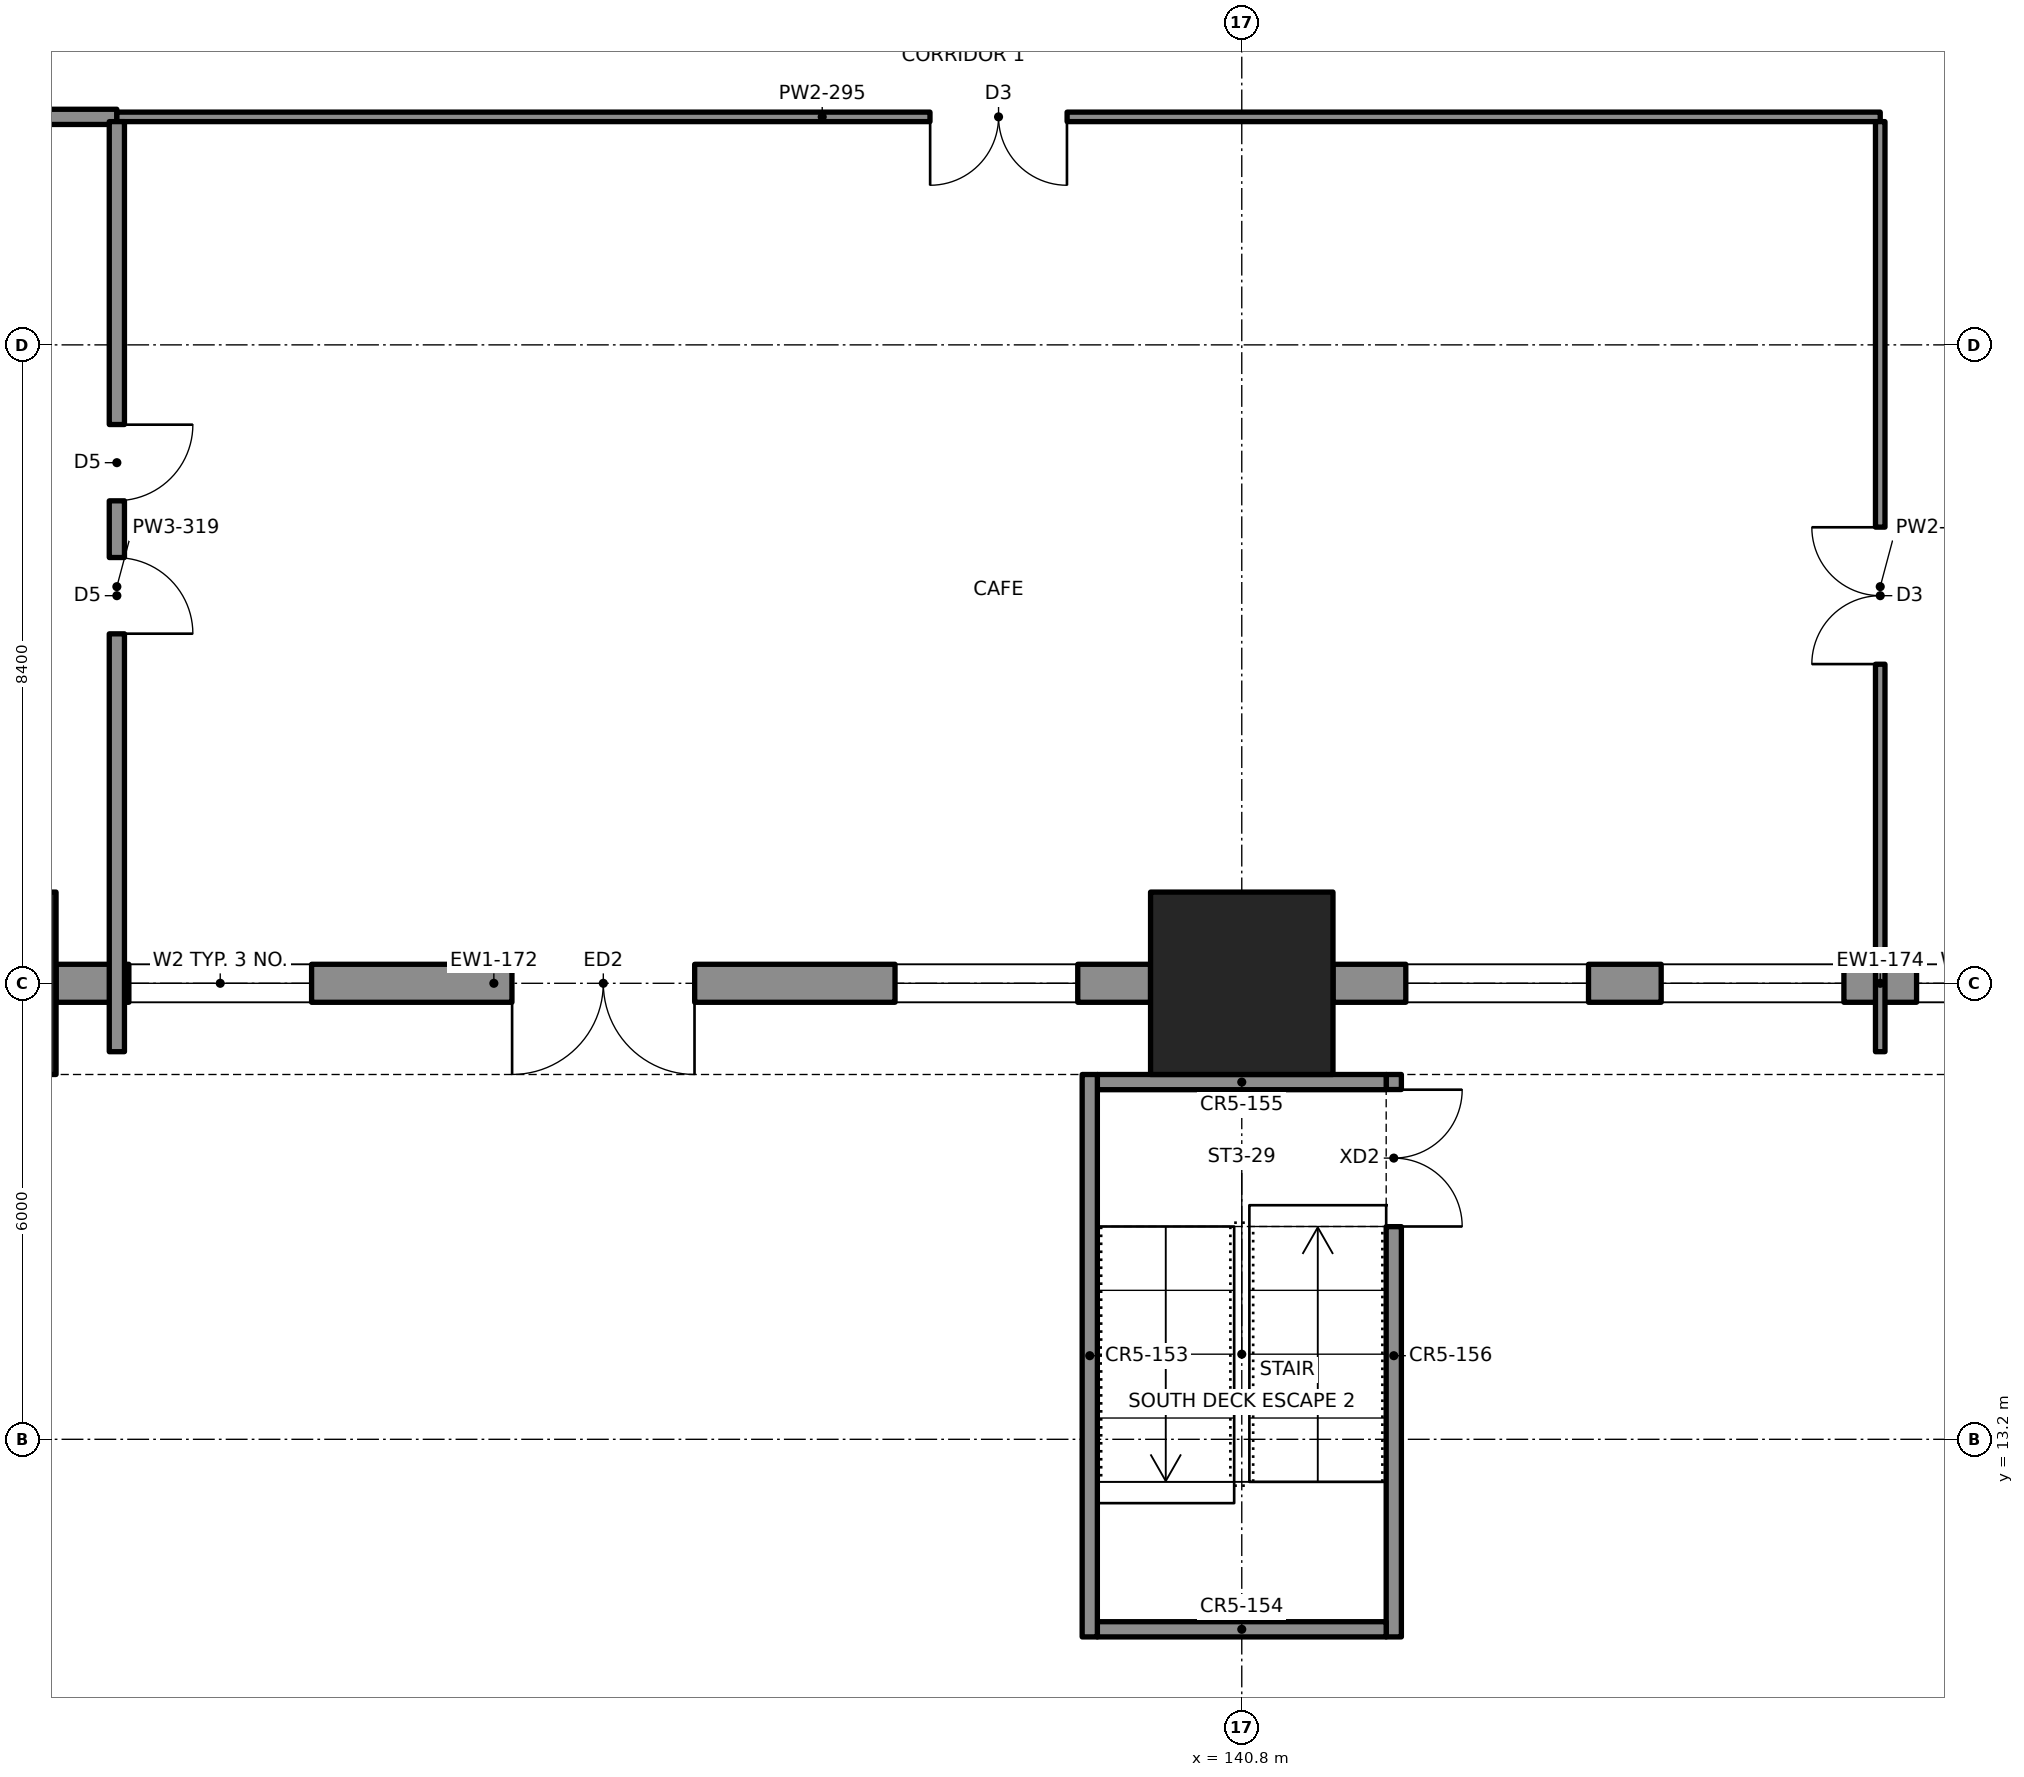
"""IFC4 building model, lengths in metres.
Left out: names, types, materials, properties, quantities, classifications, styles, units other than length and angle.
Written with IfcOpenShell. Run it as: python <this file> out.ifc"""

import sys

from ifc_helpers import new_model, si_unit, direction, frame, frame_2d, origin, origin_2d, place, context, subcontext, project, spatial, rectangle, extrude, element, fill, save


model = new_model("IFC4")
c1 = context("Model", 3, precision=1e-05, world=origin(), true_north=direction((0.0, 1.0)))
c2 = subcontext(c1, "Body", "Model", "MODEL_VIEW")
j1 = project(units=[si_unit("LENGTHUNIT", "METRE"), si_unit("PLANEANGLEUNIT", "RADIAN")], contexts=[c1])
p1 = place(None, origin())
s1 = spatial("IfcSite", under=j1, at=p1, CompositionType="ELEMENT")
p2 = place(p1, origin())
s2 = spatial("IfcBuilding", under=s1, at=p2, CompositionType="ELEMENT")
p3 = place(p2, origin())
s3 = spatial("IfcBuildingStorey", under=s2, at=p3, CompositionType="ELEMENT", Elevation=0.0)
for number, where, z_axis, x_axis in (
    (1, (124.0, 19.2, -0.9), (0.0, 0.0, 1.0), (1.0, 0.0, 0.0)),
    (2, (140.8, 19.2, -0.9), (0.0, 0.0, 1.0), (1.0, 0.0, 0.0)),
):
    element("IfcColumn", number, at=place(p3, frame(where, z_axis=z_axis, x_axis=x_axis)), inside=s3, PredefinedType="COLUMN", context=c2, shape_type="SweptSolid", body=[
        extrude(rectangle(XDim=2.4, YDim=2.4, at=origin_2d()), origin(), (0.0, 0.0, 1.0), 5.3),
    ])
p4 = place(p3, frame((125.2, 19.2, 0.0), z_axis=(0.0, 0.0, 1.0), x_axis=(1.0, 0.0, 0.0)))
e3 = element("IfcWall", 3, at=p4, inside=s3, PredefinedType="SOLIDWALL", context=c2, shape_type="SweptSolid", body=[
    extrude(rectangle(XDim=14.4, YDim=0.5, at=frame_2d((7.2, 0.0))), origin(), (0.0, 0.0, 1.0), 3.65),
])
p5 = place(p4, frame((0.96, 0.0, 0.45)))
e4 = element("IfcOpeningElement", 4, at=p5, cuts=e3, PredefinedType="OPENING", context=c2, shape_type="SweptSolid", body=[
    extrude(rectangle(XDim=2.4, YDim=2.7, at=frame_2d((1.2, 1.35))), frame((0.0, 0.26, 0.0), z_axis=(0.0, -1.0, 0.0), x_axis=(1.0, 0.0, 0.0)), (0.0, 0.0, 1.0), 0.52),
])
p6 = place(p4, frame((11.04, 0.0, 0.45)))
e5 = element("IfcOpeningElement", 5, at=p6, cuts=e3, PredefinedType="OPENING", context=c2, shape_type="SweptSolid", body=[
    extrude(rectangle(XDim=2.4, YDim=2.7, at=frame_2d((1.2, 1.35))), frame((0.0, 0.26, 0.0), z_axis=(0.0, -1.0, 0.0), x_axis=(1.0, 0.0, 0.0)), (0.0, 0.0, 1.0), 0.52),
])
p7 = place(p4, frame((6.0, 0.0, 0.0)))
e6 = element("IfcOpeningElement", 6, at=p7, cuts=e3, PredefinedType="OPENING", context=c2, shape_type="SweptSolid", body=[
    extrude(rectangle(XDim=2.4, YDim=2.4, at=frame_2d((1.2, 1.2))), frame((0.0, 0.26, 0.0), z_axis=(0.0, -1.0, 0.0), x_axis=(1.0, 0.0, 0.0)), (0.0, 0.0, 1.0), 0.52),
])
p8 = place(p3, frame((142.0, 19.2, 0.0), z_axis=(0.0, 0.0, 1.0), x_axis=(1.0, 0.0, 0.0)))
e7 = element("IfcWall", 7, at=p8, inside=s3, PredefinedType="SOLIDWALL", context=c2, shape_type="SweptSolid", body=[
    extrude(rectangle(XDim=14.4, YDim=0.5, at=frame_2d((7.2, 0.0))), origin(), (0.0, 0.0, 1.0), 3.65),
])
p9 = place(p8, frame((0.96, 0.0, 0.9)))
e8 = element("IfcOpeningElement", 8, at=p9, cuts=e7, PredefinedType="OPENING", context=c2, shape_type="SweptSolid", body=[
    extrude(rectangle(XDim=2.4, YDim=1.8, at=frame_2d((1.2, 0.9))), frame((0.0, 0.26, 0.0), z_axis=(0.0, -1.0, 0.0), x_axis=(1.0, 0.0, 0.0)), (0.0, 0.0, 1.0), 0.52),
])
p10 = place(p8, frame((4.32, 0.0, 0.9)))
e9 = element("IfcOpeningElement", 9, at=p10, cuts=e7, PredefinedType="OPENING", context=c2, shape_type="SweptSolid", body=[
    extrude(rectangle(XDim=2.4, YDim=1.8, at=frame_2d((1.2, 0.9))), frame((0.0, 0.26, 0.0), z_axis=(0.0, -1.0, 0.0), x_axis=(1.0, 0.0, 0.0)), (0.0, 0.0, 1.0), 0.52),
])
p11 = place(p8, frame((7.68, 0.0, 0.9)))
e10 = element("IfcOpeningElement", 10, at=p11, cuts=e7, PredefinedType="OPENING", context=c2, shape_type="SweptSolid", body=[
    extrude(rectangle(XDim=2.4, YDim=1.8, at=frame_2d((1.2, 0.9))), frame((0.0, 0.26, 0.0), z_axis=(0.0, -1.0, 0.0), x_axis=(1.0, 0.0, 0.0)), (0.0, 0.0, 1.0), 0.52),
])
p12 = place(p8, frame((11.04, 0.0, 0.9)))
e11 = element("IfcOpeningElement", 11, at=p12, cuts=e7, PredefinedType="OPENING", context=c2, shape_type="SweptSolid", body=[
    extrude(rectangle(XDim=2.4, YDim=1.8, at=frame_2d((1.2, 0.9))), frame((0.0, 0.26, 0.0), z_axis=(0.0, -1.0, 0.0), x_axis=(1.0, 0.0, 0.0)), (0.0, 0.0, 1.0), 0.52),
])
p13 = place(p3, frame((138.8, 10.6, 0.0), z_axis=(0.0, 0.0, 1.0), x_axis=(0.0, 1.0, 0.0)))
e12 = element("IfcWall", 12, at=p13, inside=s3, PredefinedType="SOLIDWALL", context=c2, shape_type="SweptSolid", body=[
    extrude(rectangle(XDim=7.4, YDim=0.2, at=frame_2d((3.7, 0.0))), origin(), (0.0, 0.0, 1.0), 4.4),
])
p14 = place(p3, frame((142.8, 18.0, 0.0), z_axis=(0.0, 0.0, 1.0), x_axis=(0.0, -1.0, 0.0)))
e13 = element("IfcWall", 13, at=p14, inside=s3, PredefinedType="SOLIDWALL", context=c2, shape_type="SweptSolid", body=[
    extrude(rectangle(XDim=7.4, YDim=0.2, at=frame_2d((3.7, 0.0))), origin(), (0.0, 0.0, 1.0), 4.4),
])
p15 = place(p14, frame((0.2, 0.0, 0.0)))
e14 = element("IfcOpeningElement", 14, at=p15, cuts=e13, PredefinedType="OPENING", context=c2, shape_type="SweptSolid", body=[
    extrude(rectangle(XDim=1.8, YDim=2.1, at=frame_2d((0.9, 1.05))), frame((0.0, 0.11, 0.0), z_axis=(0.0, -1.0, 0.0), x_axis=(1.0, 0.0, 0.0)), (0.0, 0.0, 1.0), 0.22),
])
for number, where, z_axis, x_axis in (
    (15, (138.9, 10.7, 0.0), (0.0, 0.0, 1.0), (1.0, 0.0, 0.0)),
    (16, (138.9, 17.9, 0.0), (0.0, 0.0, 1.0), (1.0, 0.0, 0.0)),
):
    element("IfcWall", number, at=place(p3, frame(where, z_axis=z_axis, x_axis=x_axis)), inside=s3, PredefinedType="SOLIDWALL", context=c2, shape_type="SweptSolid", body=[
        extrude(rectangle(XDim=3.8, YDim=0.2, at=frame_2d((1.9, 0.0))), origin(), (0.0, 0.0, 1.0), 4.4),
    ])
p16 = place(p3, frame((118.0, 30.6, 0.0), z_axis=(0.0, 0.0, 1.0), x_axis=(1.0, 0.0, 0.0)))
e17 = element("IfcWall", 17, at=p16, inside=s3, PredefinedType="PARTITIONING", context=c2, shape_type="SweptSolid", body=[
    extrude(rectangle(XDim=8.0, YDim=0.2, at=frame_2d((4.0, 0.0))), origin(), (0.0, 0.0, 1.0), 3.65),
])
p17 = place(p16, frame((3.35, 0.0, 0.0)))
e18 = element("IfcOpeningElement", 18, at=p17, cuts=e17, PredefinedType="OPENING", context=c2, shape_type="SweptSolid", body=[
    extrude(rectangle(XDim=1.0, YDim=2.1, at=frame_2d((0.5, 1.05))), frame((0.0, 0.11, 0.0), z_axis=(0.0, -1.0, 0.0), x_axis=(1.0, 0.0, 0.0)), (0.0, 0.0, 1.0), 0.22),
])
p18 = place(p3, frame((126.0, 30.6, 0.0), z_axis=(0.0, 0.0, 1.0), x_axis=(1.0, 0.0, 0.0)))
e19 = element("IfcWall", 19, at=p18, inside=s3, PredefinedType="PARTITIONING", context=c2, shape_type="SweptSolid", body=[
    extrude(rectangle(XDim=23.2, YDim=0.125, at=frame_2d((11.6, 0.0))), origin(), (0.0, 0.0, 1.0), 3.65),
])
p19 = place(p18, frame((10.7, 0.0, 0.0)))
e20 = element("IfcOpeningElement", 20, at=p19, cuts=e19, PredefinedType="OPENING", context=c2, shape_type="SweptSolid", body=[
    extrude(rectangle(XDim=1.8, YDim=2.1, at=frame_2d((0.9, 1.05))), frame((0.0, 0.073, 0.0), z_axis=(0.0, -1.0, 0.0), x_axis=(1.0, 0.0, 0.0)), (0.0, 0.0, 1.0), 0.145),
])
p20 = place(p3, frame((126.0, 18.3, 0.0), z_axis=(0.0, 0.0, 1.0), x_axis=(0.0, 1.0, 0.0)))
e21 = element("IfcWall", 21, at=p20, inside=s3, PredefinedType="PARTITIONING", context=c2, shape_type="SweptSolid", body=[
    extrude(rectangle(XDim=12.238, YDim=0.2, at=frame_2d((6.119, 0.0))), origin(), (0.0, 0.0, 1.0), 3.65),
])
p21 = place(p20, frame((5.5, 0.0, 0.0)))
e22 = element("IfcOpeningElement", 22, at=p21, cuts=e21, PredefinedType="OPENING", context=c2, shape_type="SweptSolid", body=[
    extrude(rectangle(XDim=1.0, YDim=2.1, at=frame_2d((0.5, 1.05))), frame((0.0, 0.11, 0.0), z_axis=(0.0, -1.0, 0.0), x_axis=(1.0, 0.0, 0.0)), (0.0, 0.0, 1.0), 0.22),
])
p22 = place(p20, frame((7.25, 0.0, 0.0)))
e23 = element("IfcOpeningElement", 23, at=p22, cuts=e21, PredefinedType="OPENING", context=c2, shape_type="SweptSolid", body=[
    extrude(rectangle(XDim=1.0, YDim=2.1, at=frame_2d((0.5, 1.05))), frame((0.0, 0.11, 0.0), z_axis=(0.0, -1.0, 0.0), x_axis=(1.0, 0.0, 0.0)), (0.0, 0.0, 1.0), 0.22),
])
p23 = place(p3, frame((149.2, 18.3, 0.0), z_axis=(0.0, 0.0, 1.0), x_axis=(0.0, 1.0, 0.0)))
e24 = element("IfcWall", 24, at=p23, inside=s3, PredefinedType="PARTITIONING", context=c2, shape_type="SweptSolid", body=[
    extrude(rectangle(XDim=12.238, YDim=0.125, at=frame_2d((6.119, 0.0))), origin(), (0.0, 0.0, 1.0), 3.65),
])
p24 = place(p23, frame((5.1, 0.0, 0.0)))
e25 = element("IfcOpeningElement", 25, at=p24, cuts=e24, PredefinedType="OPENING", context=c2, shape_type="SweptSolid", body=[
    extrude(rectangle(XDim=1.8, YDim=2.1, at=frame_2d((0.9, 1.05))), frame((0.0, 0.073, 0.0), z_axis=(0.0, -1.0, 0.0), x_axis=(1.0, 0.0, 0.0)), (0.0, 0.0, 1.0), 0.145),
])
p25 = place(p5, origin())
e26 = element("IfcWindow", 26, at=p25, inside=s3, PartitioningType="SINGLE_PANEL", PredefinedType="WINDOW", context=c2, shape_type="SweptSolid", body=[
    extrude(rectangle(XDim=2.4, YDim=2.7, at=frame_2d((1.2, 1.35))), frame((0.0, 0.03, 0.0), z_axis=(0.0, -1.0, 0.0), x_axis=(1.0, 0.0, 0.0)), (0.0, 0.0, 1.0), 0.06),
])
fill(e4, e26)
p26 = place(p6, origin())
e27 = element("IfcWindow", 27, at=p26, inside=s3, PartitioningType="SINGLE_PANEL", PredefinedType="WINDOW", context=c2, shape_type="SweptSolid", body=[
    extrude(rectangle(XDim=2.4, YDim=2.7, at=frame_2d((1.2, 1.35))), frame((0.0, 0.03, 0.0), z_axis=(0.0, -1.0, 0.0), x_axis=(1.0, 0.0, 0.0)), (0.0, 0.0, 1.0), 0.06),
])
fill(e5, e27)
p27 = place(p7, origin())
e28 = element("IfcDoor", 28, at=p27, inside=s3, OperationType="DOUBLE_DOOR_SINGLE_SWING", PredefinedType="DOOR", context=c2, shape_type="SweptSolid", body=[
    extrude(rectangle(XDim=2.4, YDim=2.4, at=frame_2d((1.2, 1.2))), frame((0.0, 0.025, 0.0), z_axis=(0.0, -1.0, 0.0), x_axis=(1.0, 0.0, 0.0)), (0.0, 0.0, 1.0), 0.05),
])
fill(e6, e28)
p28 = place(p9, origin())
e29 = element("IfcWindow", 29, at=p28, inside=s3, PartitioningType="SINGLE_PANEL", PredefinedType="WINDOW", context=c2, shape_type="SweptSolid", body=[
    extrude(rectangle(XDim=2.4, YDim=1.8, at=frame_2d((1.2, 0.9))), frame((0.0, 0.03, 0.0), z_axis=(0.0, -1.0, 0.0), x_axis=(1.0, 0.0, 0.0)), (0.0, 0.0, 1.0), 0.06),
])
fill(e8, e29)
p29 = place(p10, origin())
e30 = element("IfcWindow", 30, at=p29, inside=s3, PartitioningType="SINGLE_PANEL", PredefinedType="WINDOW", context=c2, shape_type="SweptSolid", body=[
    extrude(rectangle(XDim=2.4, YDim=1.8, at=frame_2d((1.2, 0.9))), frame((0.0, 0.03, 0.0), z_axis=(0.0, -1.0, 0.0), x_axis=(1.0, 0.0, 0.0)), (0.0, 0.0, 1.0), 0.06),
])
fill(e9, e30)
p30 = place(p11, origin())
e31 = element("IfcWindow", 31, at=p30, inside=s3, PartitioningType="SINGLE_PANEL", PredefinedType="WINDOW", context=c2, shape_type="SweptSolid", body=[
    extrude(rectangle(XDim=2.4, YDim=1.8, at=frame_2d((1.2, 0.9))), frame((0.0, 0.03, 0.0), z_axis=(0.0, -1.0, 0.0), x_axis=(1.0, 0.0, 0.0)), (0.0, 0.0, 1.0), 0.06),
])
fill(e10, e31)
p31 = place(p15, origin())
e32 = element("IfcDoor", 32, at=p31, inside=s3, OperationType="DOUBLE_DOOR_SINGLE_SWING", PredefinedType="DOOR", context=c2, shape_type="SweptSolid", body=[
    extrude(rectangle(XDim=1.8, YDim=2.1, at=frame_2d((0.9, 1.05))), frame((0.0, 0.025, 0.0), z_axis=(0.0, -1.0, 0.0), x_axis=(1.0, 0.0, 0.0)), (0.0, 0.0, 1.0), 0.05),
])
fill(e14, e32)
p32 = place(p21, origin())
e33 = element("IfcDoor", 33, at=p32, inside=s3, OperationType="SINGLE_SWING_LEFT", PredefinedType="DOOR", context=c2, shape_type="SweptSolid", body=[
    extrude(rectangle(XDim=1.0, YDim=2.1, at=frame_2d((0.5, 1.05))), frame((0.0, 0.025, 0.0), z_axis=(0.0, -1.0, 0.0), x_axis=(1.0, 0.0, 0.0)), (0.0, 0.0, 1.0), 0.05),
])
fill(e22, e33)
p33 = place(p19, origin())
e34 = element("IfcDoor", 34, at=p33, inside=s3, OperationType="DOUBLE_DOOR_SINGLE_SWING", PredefinedType="DOOR", context=c2, shape_type="SweptSolid", body=[
    extrude(rectangle(XDim=1.8, YDim=2.1, at=frame_2d((0.9, 1.05))), frame((0.0, 0.025, 0.0), z_axis=(0.0, -1.0, 0.0), x_axis=(1.0, 0.0, 0.0)), (0.0, 0.0, 1.0), 0.05),
])
fill(e20, e34)
p34 = place(p22, origin())
e35 = element("IfcDoor", 35, at=p34, inside=s3, OperationType="SINGLE_SWING_RIGHT", PredefinedType="DOOR", context=c2, shape_type="SweptSolid", body=[
    extrude(rectangle(XDim=1.0, YDim=2.1, at=frame_2d((0.5, 1.05))), frame((0.0, 0.025, 0.0), z_axis=(0.0, -1.0, 0.0), x_axis=(1.0, 0.0, 0.0)), (0.0, 0.0, 1.0), 0.05),
])
fill(e23, e35)
p35 = place(p24, origin())
e36 = element("IfcDoor", 36, at=p35, inside=s3, OperationType="DOUBLE_DOOR_SINGLE_SWING", PredefinedType="DOOR", context=c2, shape_type="SweptSolid", body=[
    extrude(rectangle(XDim=1.8, YDim=2.1, at=frame_2d((0.9, 1.05))), frame((0.0, 0.025, 0.0), z_axis=(0.0, -1.0, 0.0), x_axis=(1.0, 0.0, 0.0)), (0.0, 0.0, 1.0), 0.05),
])
fill(e25, e36)
save(model, sys.argv[1])
